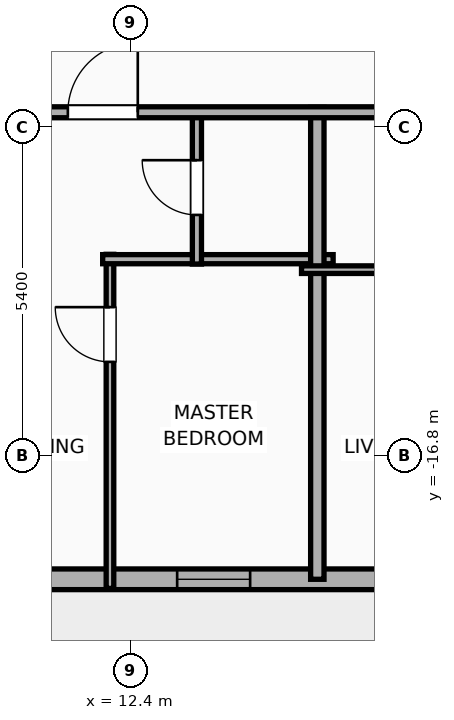
"""IFC4 building model, lengths in metres.
Left out: names, types, materials, properties, quantities, classifications, styles, units other than length and angle.
Written with IfcOpenShell. Run it as: python <this file> out.ifc"""

import sys

from ifc_helpers import new_model, si_unit, direction, frame, frame_2d, origin, place, context, subcontext, project, spatial, rectangle, extrude, element, fill, save


model = new_model("IFC4")
c1 = context("Model", 3, precision=1e-05, world=origin(), true_north=direction((0.0, 1.0)))
c2 = subcontext(c1, "Body", "Model", "MODEL_VIEW")
j1 = project(units=[si_unit("LENGTHUNIT", "METRE"), si_unit("PLANEANGLEUNIT", "RADIAN")], contexts=[c1])
p1 = place(None, origin())
s1 = spatial("IfcSite", under=j1, at=p1, CompositionType="ELEMENT")
p2 = place(p1, origin())
s2 = spatial("IfcBuilding", under=s1, at=p2, CompositionType="ELEMENT")
p3 = place(p2, frame((0.0, 0.0, 231.4)))
s3 = spatial("IfcBuildingStorey", under=s2, at=p3, CompositionType="ELEMENT", Elevation=231.4)
p4 = place(p3, frame((26.783, -18.83, 0.0), z_axis=(0.0, 0.0, 1.0), x_axis=(-1.0, 0.0, 0.0)))
e1 = element("IfcWall", 1, at=p4, inside=s3, PredefinedType="ELEMENTEDWALL", context=c2, shape_type="SweptSolid", body=[
    extrude(rectangle(XDim=49.566, YDim=0.34, at=frame_2d((24.783, 0.0))), origin(), (0.0, 0.0, 1.0), 3.65),
])
p5 = place(p4, frame((23.583, 0.0, 0.75)))
e2 = element("IfcOpeningElement", 2, at=p5, cuts=e1, PredefinedType="OPENING", context=c2, shape_type="SweptSolid", body=[
    extrude(rectangle(XDim=2.4, YDim=2.1, at=frame_2d((1.2, 1.05))), frame((0.0, 0.18, 0.0), z_axis=(0.0, -1.0, 0.0), x_axis=(1.0, 0.0, 0.0)), (0.0, 0.0, 1.0), 0.36),
])
p6 = place(p4, frame((41.756, 0.0, 0.75)))
e3 = element("IfcOpeningElement", 3, at=p6, cuts=e1, PredefinedType="OPENING", context=c2, shape_type="SweptSolid", body=[
    extrude(rectangle(XDim=2.4, YDim=2.1, at=frame_2d((1.2, 1.05))), frame((0.0, 0.18, 0.0), z_axis=(0.0, -1.0, 0.0), x_axis=(1.0, 0.0, 0.0)), (0.0, 0.0, 1.0), 0.36),
])
p7 = place(p4, frame((47.222, 0.0, 0.75)))
e4 = element("IfcOpeningElement", 4, at=p7, cuts=e1, PredefinedType="OPENING", context=c2, shape_type="SweptSolid", body=[
    extrude(rectangle(XDim=1.2, YDim=2.05, at=frame_2d((0.6, 1.025))), frame((0.0, 0.18, 0.0), z_axis=(0.0, -1.0, 0.0), x_axis=(1.0, 0.0, 0.0)), (0.0, 0.0, 1.0), 0.36),
])
p8 = place(p4, frame((45.263, 0.0, 0.75)))
e5 = element("IfcOpeningElement", 5, at=p8, cuts=e1, PredefinedType="OPENING", context=c2, shape_type="SweptSolid", body=[
    extrude(rectangle(XDim=1.2, YDim=2.05, at=frame_2d((0.6, 1.025))), frame((0.0, 0.18, 0.0), z_axis=(0.0, -1.0, 0.0), x_axis=(1.0, 0.0, 0.0)), (0.0, 0.0, 1.0), 0.36),
])
p9 = place(p4, frame((37.289, 0.0, 0.75)))
e6 = element("IfcOpeningElement", 6, at=p9, cuts=e1, PredefinedType="OPENING", context=c2, shape_type="SweptSolid", body=[
    extrude(rectangle(XDim=1.2, YDim=2.05, at=frame_2d((0.6, 1.025))), frame((0.0, 0.18, 0.0), z_axis=(0.0, -1.0, 0.0), x_axis=(1.0, 0.0, 0.0)), (0.0, 0.0, 1.0), 0.36),
])
p10 = place(p4, frame((16.115, 0.0, 0.75)))
e7 = element("IfcOpeningElement", 7, at=p10, cuts=e1, PredefinedType="OPENING", context=c2, shape_type="SweptSolid", body=[
    extrude(rectangle(XDim=1.2, YDim=2.05, at=frame_2d((0.6, 1.025))), frame((0.0, 0.18, 0.0), z_axis=(0.0, -1.0, 0.0), x_axis=(1.0, 0.0, 0.0)), (0.0, 0.0, 1.0), 0.36),
])
p11 = place(p4, frame((12.422, 0.0, 0.75)))
e8 = element("IfcOpeningElement", 8, at=p11, cuts=e1, PredefinedType="OPENING", context=c2, shape_type="SweptSolid", body=[
    extrude(rectangle(XDim=1.2, YDim=2.05, at=frame_2d((0.6, 1.025))), frame((0.0, 0.18, 0.0), z_axis=(0.0, -1.0, 0.0), x_axis=(1.0, 0.0, 0.0)), (0.0, 0.0, 1.0), 0.36),
])
p12 = place(p4, frame((8.01, 0.0, 0.75)))
e9 = element("IfcOpeningElement", 9, at=p12, cuts=e1, PredefinedType="OPENING", context=c2, shape_type="SweptSolid", body=[
    extrude(rectangle(XDim=1.2, YDim=2.05, at=frame_2d((0.6, 1.025))), frame((0.0, 0.18, 0.0), z_axis=(0.0, -1.0, 0.0), x_axis=(1.0, 0.0, 0.0)), (0.0, 0.0, 1.0), 0.36),
])
p13 = place(p4, frame((5.037, 0.0, 0.75)))
e10 = element("IfcOpeningElement", 10, at=p13, cuts=e1, PredefinedType="OPENING", context=c2, shape_type="SweptSolid", body=[
    extrude(rectangle(XDim=1.2, YDim=2.05, at=frame_2d((0.6, 1.025))), frame((0.0, 0.18, 0.0), z_axis=(0.0, -1.0, 0.0), x_axis=(1.0, 0.0, 0.0)), (0.0, 0.0, 1.0), 0.36),
])
p14 = place(p4, frame((1.811, 0.0, 0.75)))
e11 = element("IfcOpeningElement", 11, at=p14, cuts=e1, PredefinedType="OPENING", context=c2, shape_type="SweptSolid", body=[
    extrude(rectangle(XDim=1.2, YDim=2.05, at=frame_2d((0.6, 1.025))), frame((0.0, 0.18, 0.0), z_axis=(0.0, -1.0, 0.0), x_axis=(1.0, 0.0, 0.0)), (0.0, 0.0, 1.0), 0.36),
])
p15 = place(p4, frame((32.253, 0.0, 0.75)))
e12 = element("IfcOpeningElement", 12, at=p15, cuts=e1, PredefinedType="OPENING", context=c2, shape_type="SweptSolid", body=[
    extrude(rectangle(XDim=1.2, YDim=2.05, at=frame_2d((0.6, 1.025))), frame((0.0, 0.18, 0.0), z_axis=(0.0, -1.0, 0.0), x_axis=(1.0, 0.0, 0.0)), (0.0, 0.0, 1.0), 0.36),
])
p16 = place(p4, frame((27.853, 0.0, 0.75)))
e13 = element("IfcOpeningElement", 13, at=p16, cuts=e1, PredefinedType="OPENING", context=c2, shape_type="SweptSolid", body=[
    extrude(rectangle(XDim=1.2, YDim=2.05, at=frame_2d((0.6, 1.025))), frame((0.0, 0.18, 0.0), z_axis=(0.0, -1.0, 0.0), x_axis=(1.0, 0.0, 0.0)), (0.0, 0.0, 1.0), 0.36),
])
p17 = place(p4, frame((20.473, 0.0, 0.75)))
e14 = element("IfcOpeningElement", 14, at=p17, cuts=e1, PredefinedType="OPENING", context=c2, shape_type="SweptSolid", body=[
    extrude(rectangle(XDim=1.2, YDim=2.05, at=frame_2d((0.6, 1.025))), frame((0.0, 0.18, 0.0), z_axis=(0.0, -1.0, 0.0), x_axis=(1.0, 0.0, 0.0)), (0.0, 0.0, 1.0), 0.36),
])
p18 = place(p3, frame((12.056, -18.98, 0.0), z_axis=(0.0, 0.0, 1.0), x_axis=(0.0, 1.0, 0.0)))
e15 = element("IfcWall", 15, at=p18, inside=s3, PredefinedType="PARTITIONING", context=c2, shape_type="SweptSolid", body=[
    extrude(rectangle(XDim=5.494, YDim=0.125, at=frame_2d((2.747, 0.0))), origin(), (0.0, 0.0, 1.0), 3.65),
])
p19 = place(p18, frame((3.725, 0.0, 0.0)))
e16 = element("IfcOpeningElement", 16, at=p19, cuts=e15, PredefinedType="OPENING", context=c2, shape_type="SweptSolid", body=[
    extrude(rectangle(XDim=0.9, YDim=2.05, at=frame_2d((0.45, 1.025))), frame((0.0, 0.073, 0.0), z_axis=(0.0, -1.0, 0.0), x_axis=(1.0, 0.0, 0.0)), (0.0, 0.0, 1.0), 0.145),
])
p20 = place(p3, frame((11.936, -13.566, 0.0), z_axis=(0.0, 0.0, 1.0), x_axis=(1.0, 0.0, 0.0)))
e17 = element("IfcWall", 17, at=p20, inside=s3, PredefinedType="PLUMBINGWALL", context=c2, shape_type="SweptSolid", body=[
    extrude(rectangle(XDim=3.79, YDim=0.15, at=frame_2d((1.895, 0.0))), origin(), (0.0, 0.0, 1.0), 3.65),
])
p21 = place(p3, frame((13.486, -13.646, 0.0), z_axis=(0.0, 0.0, 1.0), x_axis=(0.0, 1.0, 0.0)))
e18 = element("IfcWall", 18, at=p21, inside=s3, PredefinedType="PLUMBINGWALL", context=c2, shape_type="SweptSolid", body=[
    extrude(rectangle(XDim=2.516, YDim=0.15, at=frame_2d((1.258, 0.0))), origin(), (0.0, 0.0, 1.0), 3.65),
])
p22 = place(p21, frame((0.808, 0.0, 0.0)))
e19 = element("IfcOpeningElement", 19, at=p22, cuts=e18, PredefinedType="OPENING", context=c2, shape_type="SweptSolid", body=[
    extrude(rectangle(XDim=0.9, YDim=2.05, at=frame_2d((0.45, 1.025))), frame((0.0, 0.085, 0.0), z_axis=(0.0, -1.0, 0.0), x_axis=(1.0, 0.0, 0.0)), (0.0, 0.0, 1.0), 0.17),
])
p23 = place(p3, frame((15.466, -18.83, 0.0), z_axis=(0.0, 0.0, 1.0), x_axis=(0.0, 1.0, 0.0)))
e20 = element("IfcWall", 20, at=p23, inside=s3, PredefinedType="PARTITIONING", context=c2, shape_type="SweptSolid", body=[
    extrude(rectangle(XDim=7.76, YDim=0.22, at=frame_2d((3.88, 0.0))), origin(), (0.0, 0.0, 1.0), 3.65),
])
p24 = place(p3, frame((15.206, -13.738, 0.0), z_axis=(0.0, 0.0, 1.0), x_axis=(1.0, 0.0, 0.0)))
e21 = element("IfcWall", 21, at=p24, inside=s3, PredefinedType="PARTITIONING", context=c2, shape_type="SweptSolid", body=[
    extrude(rectangle(XDim=2.69, YDim=0.125, at=frame_2d((1.345, 0.0))), origin(), (0.0, 0.0, 1.0), 3.65),
])
p25 = place(p3, frame((8.08, -11.15, 0.0), z_axis=(0.0, 0.0, 1.0), x_axis=(1.0, 0.0, 0.0)))
e22 = element("IfcWall", 22, at=p25, inside=s3, PredefinedType="PARTITIONING", context=c2, shape_type="SweptSolid", body=[
    extrude(rectangle(XDim=22.15, YDim=0.18, at=frame_2d((11.075, 0.0))), origin(), (0.0, 0.0, 1.0), 3.65),
])
p26 = place(p25, frame((3.283, 0.0, 0.0)))
e23 = element("IfcOpeningElement", 23, at=p26, cuts=e22, PredefinedType="OPENING", context=c2, shape_type="SweptSolid", body=[
    extrude(rectangle(XDim=1.15, YDim=2.05, at=frame_2d((0.575, 1.025))), frame((0.0, 0.1, 0.0), z_axis=(0.0, -1.0, 0.0), x_axis=(1.0, 0.0, 0.0)), (0.0, 0.0, 1.0), 0.2),
])
p27 = place(p25, frame((10.668, 0.0, 0.0)))
e24 = element("IfcOpeningElement", 24, at=p27, cuts=e22, PredefinedType="OPENING", context=c2, shape_type="SweptSolid", body=[
    extrude(rectangle(XDim=1.15, YDim=2.05, at=frame_2d((0.575, 1.025))), frame((0.0, 0.1, 0.0), z_axis=(0.0, -1.0, 0.0), x_axis=(1.0, 0.0, 0.0)), (0.0, 0.0, 1.0), 0.2),
])
p28 = place(p25, frame((18.084, 0.0, 0.0)))
e25 = element("IfcOpeningElement", 25, at=p28, cuts=e22, PredefinedType="OPENING", context=c2, shape_type="SweptSolid", body=[
    extrude(rectangle(XDim=1.15, YDim=2.05, at=frame_2d((0.575, 1.025))), frame((0.0, 0.1, 0.0), z_axis=(0.0, -1.0, 0.0), x_axis=(1.0, 0.0, 0.0)), (0.0, 0.0, 1.0), 0.2),
])
p29 = place(p11, origin())
e26 = element("IfcWindow", 26, at=p29, inside=s3, PartitioningType="SINGLE_PANEL", PredefinedType="WINDOW", context=c2, shape_type="SweptSolid", body=[
    extrude(rectangle(XDim=1.2, YDim=2.05, at=frame_2d((0.6, 1.025))), frame((0.0, 0.03, 0.0), z_axis=(0.0, -1.0, 0.0), x_axis=(1.0, 0.0, 0.0)), (0.0, 0.0, 1.0), 0.06),
])
fill(e8, e26)
p30 = place(p19, origin())
e27 = element("IfcDoor", 27, at=p30, inside=s3, OperationType="SINGLE_SWING_RIGHT", PredefinedType="DOOR", context=c2, shape_type="SweptSolid", body=[
    extrude(rectangle(XDim=0.9, YDim=2.05, at=frame_2d((0.45, 1.025))), frame((0.0, 0.025, 0.0), z_axis=(0.0, -1.0, 0.0), x_axis=(1.0, 0.0, 0.0)), (0.0, 0.0, 1.0), 0.05),
])
fill(e16, e27)
p31 = place(p22, origin())
e28 = element("IfcDoor", 28, at=p31, inside=s3, OperationType="SINGLE_SWING_RIGHT", PredefinedType="DOOR", context=c2, shape_type="SweptSolid", body=[
    extrude(rectangle(XDim=0.9, YDim=2.05, at=frame_2d((0.45, 1.025))), frame((0.0, 0.025, 0.0), z_axis=(0.0, -1.0, 0.0), x_axis=(1.0, 0.0, 0.0)), (0.0, 0.0, 1.0), 0.05),
])
fill(e19, e28)
p32 = place(p26, origin())
e29 = element("IfcDoor", 29, at=p32, inside=s3, OperationType="SINGLE_SWING_RIGHT", PredefinedType="DOOR", context=c2, shape_type="SweptSolid", body=[
    extrude(rectangle(XDim=1.15, YDim=2.05, at=frame_2d((0.575, 1.025))), frame((0.0, 0.025, 0.0), z_axis=(0.0, -1.0, 0.0), x_axis=(1.0, 0.0, 0.0)), (0.0, 0.0, 1.0), 0.05),
])
fill(e23, e29)
save(model, sys.argv[1])
